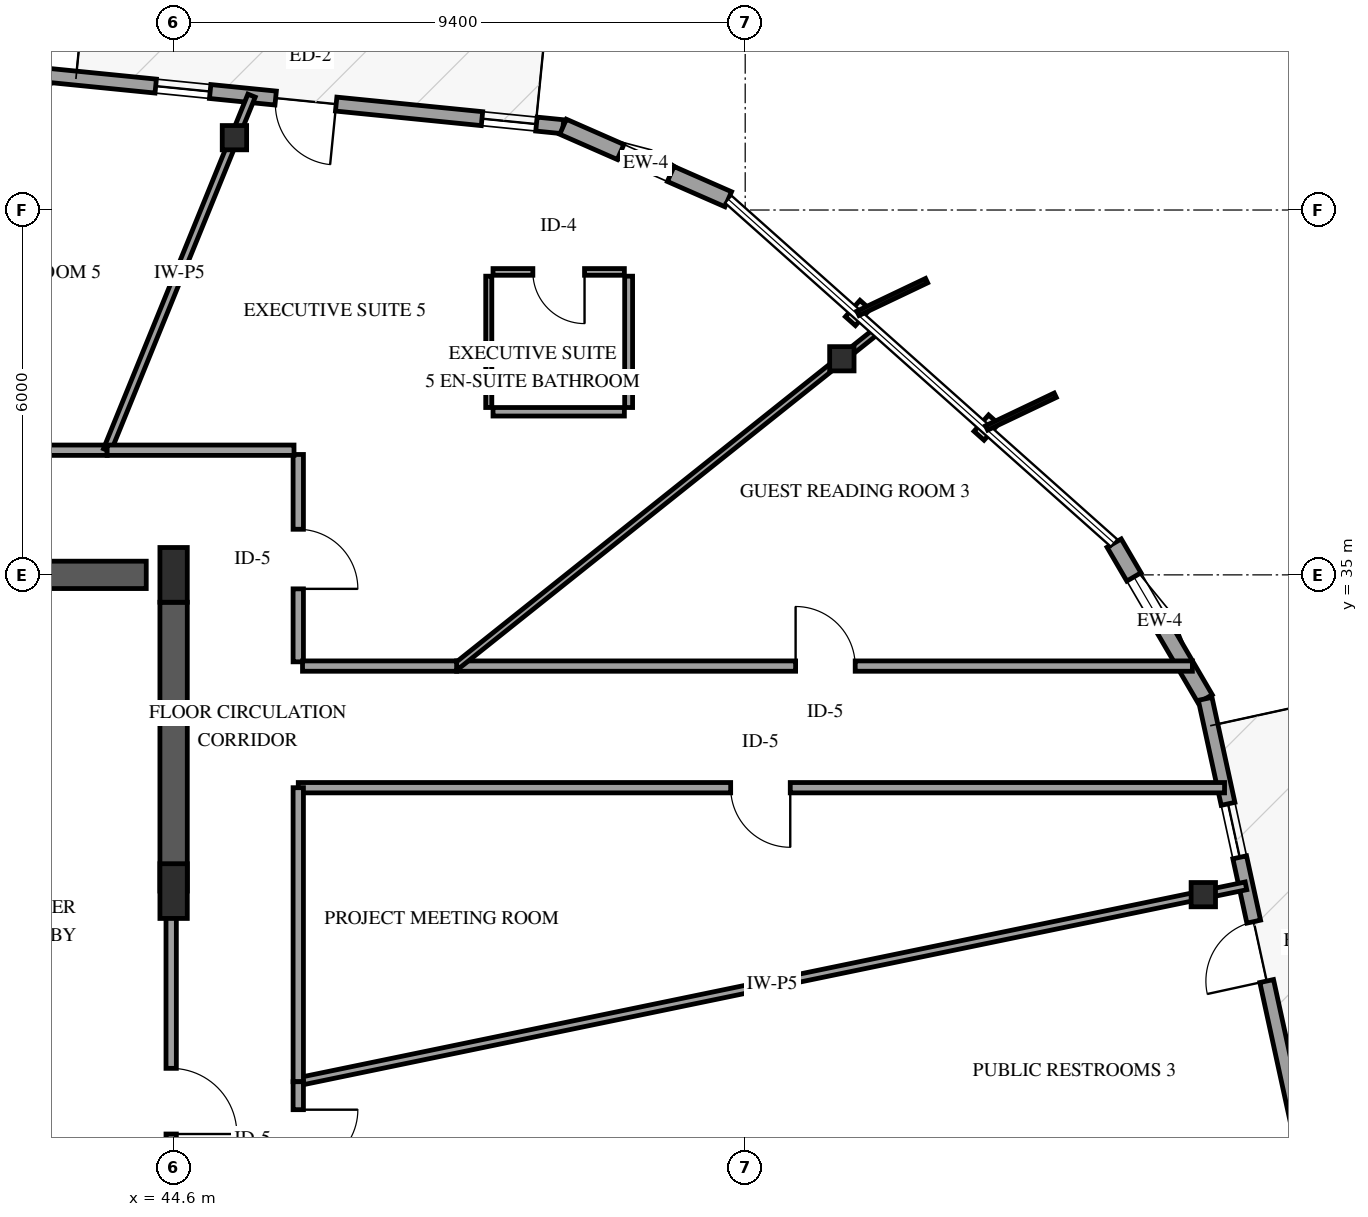
"""IFC4 building model, lengths in metres.
Left out: names, types, materials, properties, quantities, classifications, styles, units other than length and angle.
Written with IfcOpenShell. Run it as: python <this file> out.ifc"""

import sys

from ifc_helpers import new_model, si_unit, direction, frame, frame_2d, origin, origin_2d, place, context, subcontext, project, spatial, rectangle, i_section, extrude, element, fill, save


model = new_model("IFC4")
c1 = context("Model", 3, precision=1e-05, world=origin(), true_north=direction((0.0, 1.0)))
c2 = subcontext(c1, "Body", "Model", "MODEL_VIEW")
j1 = project(units=[si_unit("LENGTHUNIT", "METRE"), si_unit("PLANEANGLEUNIT", "RADIAN")], contexts=[c1])
p1 = place(None, origin())
s1 = spatial("IfcSite", under=j1, at=p1, CompositionType="ELEMENT")
p2 = place(p1, origin())
s2 = spatial("IfcBuilding", under=s1, at=p2, CompositionType="ELEMENT")
p3 = place(p2, frame((0.0, 0.0, 276.25)))
s3 = spatial("IfcBuildingStorey", under=s2, at=p3, CompositionType="ELEMENT", Elevation=276.25)
p4 = place(p3, frame((41.3, 35.0, 0.0), z_axis=(0.0, 0.0, 1.0), x_axis=(1.0, 0.0, 0.0)))
e1 = element("IfcWall", 1, at=p4, inside=s3, PredefinedType="SHEAR", context=c2, shape_type="SweptSolid", body=[
    extrude(rectangle(XDim=2.85, YDim=0.45, at=frame_2d((1.425, 0.0))), origin(), (0.0, 0.0, 1.0), 3.75),
])
p5 = place(p3, frame((44.6, 29.8, 0.0), z_axis=(0.0, 0.0, 1.0), x_axis=(0.0, 1.0, 0.0)))
e2 = element("IfcWall", 2, at=p5, inside=s3, PredefinedType="SHEAR", context=c2, shape_type="SweptSolid", body=[
    extrude(rectangle(XDim=4.75, YDim=0.45, at=frame_2d((2.375, 0.0))), origin(), (0.0, 0.0, 1.0), 3.75),
])
for number, where, z_axis, x_axis in (
    (3, (44.6, 29.8, 0.0), (0.0, 0.0, 1.0), (1.0, 0.0, 0.0)),
    (4, (44.6, 35.0, 0.0), (0.0, 0.0, 1.0), (1.0, 0.0, 0.0)),
):
    element("IfcColumn", number, at=place(p3, frame(where, z_axis=z_axis, x_axis=x_axis)), inside=s3, PredefinedType="PILASTER", context=c2, shape_type="SweptSolid", body=[
        extrude(rectangle(XDim=0.45, YDim=0.9, at=origin_2d()), origin(), (0.0, 0.0, 1.0), 3.75),
    ])
for number, where, z_axis, x_axis in (
    (5, (61.534, 29.741, 0.0), (0.0, 0.0, 1.0), (1.0, 0.0, 0.0)),
    (6, (55.589, 38.554, 0.0), (0.0, 0.0, 1.0), (1.0, 0.0, 0.0)),
    (7, (45.6, 42.189, 0.0), (0.0, 0.0, 1.0), (1.0, 0.0, 0.0)),
):
    element("IfcColumn", number, at=place(p3, frame(where, z_axis=z_axis, x_axis=x_axis)), inside=s3, PredefinedType="COLUMN", context=c2, shape_type="SweptSolid", body=[
        extrude(i_section(OverallWidth=0.401, OverallDepth=0.399, WebThickness=0.025, FlangeThickness=0.04, FilletRadius=0.038, at=origin_2d()), origin(), (0.0, 0.0, 1.0), 3.75),
    ])
p6 = place(p3, frame((51.005, 42.369, 0.0), z_axis=(0.0, 0.0, 1.0), x_axis=(-0.995055090482, 0.099324553384, 0.0)))
e8 = element("IfcWall", 8, at=p6, inside=s3, PredefinedType="SOLIDWALL", context=c2, shape_type="SweptSolid", body=[
    extrude(rectangle(XDim=8.5, YDim=0.23, at=frame_2d((4.25, 0.0))), origin(), (0.0, 0.0, 1.0), 2.829),
])
p7 = place(p6, frame((3.75, 0.0, 0.0)))
e9 = element("IfcOpeningElement", 9, at=p7, cuts=e8, PredefinedType="OPENING", context=c2, shape_type="SweptSolid", body=[
    extrude(rectangle(XDim=1.0, YDim=2.15, at=frame_2d((0.5, 1.075))), frame((0.0, 0.125, 0.0), z_axis=(0.0, -1.0, 0.0), x_axis=(1.0, 0.0, 0.0)), (0.0, 0.0, 1.0), 0.25),
])
p8 = place(p6, frame((0.44, 0.0, 0.72)))
e10 = element("IfcOpeningElement", 10, at=p8, cuts=e8, PredefinedType="OPENING", context=c2, shape_type="SweptSolid", body=[
    extrude(rectangle(XDim=0.9, YDim=1.5, at=frame_2d((0.45, 0.75))), frame((0.0, 0.125, 0.0), z_axis=(0.0, -1.0, 0.0), x_axis=(1.0, 0.0, 0.0)), (0.0, 0.0, 1.0), 0.25),
])
p9 = place(p6, frame((5.833, 0.0, 0.72)))
e11 = element("IfcOpeningElement", 11, at=p9, cuts=e8, PredefinedType="OPENING", context=c2, shape_type="SweptSolid", body=[
    extrude(rectangle(XDim=0.9, YDim=1.5, at=frame_2d((0.45, 0.75))), frame((0.0, 0.125, 0.0), z_axis=(0.0, -1.0, 0.0), x_axis=(1.0, 0.0, 0.0)), (0.0, 0.0, 1.0), 0.25),
])
p10 = place(p3, frame((61.564, 32.961, 0.0), z_axis=(0.0, 0.0, 1.0), x_axis=(-0.504525797249, 0.863396617963, 0.0)))
e12 = element("IfcWall", 12, at=p10, inside=s3, PredefinedType="SOLIDWALL", context=c2, shape_type="SweptSolid", body=[
    extrude(rectangle(XDim=2.967, YDim=0.27, at=frame_2d((1.483, 0.0))), origin(), (0.0, 0.0, 1.0), 2.829),
])
p11 = place(p10, frame((1.422, 0.0, 0.75)))
e13 = element("IfcOpeningElement", 13, at=p11, cuts=e12, PredefinedType="OPENING", context=c2, shape_type="SweptSolid", body=[
    extrude(rectangle(XDim=0.9, YDim=1.5, at=frame_2d((0.45, 0.75))), frame((0.0, 0.145, 0.0), z_axis=(0.0, -1.0, 0.0), x_axis=(1.0, 0.0, 0.0)), (0.0, 0.0, 1.0), 0.29),
])
p12 = place(p3, frame((63.375, 24.656, 0.0), z_axis=(0.0, 0.0, 1.0), x_axis=(-0.213011537402, 0.977049683964, 0.0)))
e14 = element("IfcWall", 14, at=p12, inside=s3, PredefinedType="SOLIDWALL", context=c2, shape_type="SweptSolid", body=[
    extrude(rectangle(XDim=8.5, YDim=0.23, at=frame_2d((4.25, 0.0))), origin(), (0.0, 0.0, 1.0), 2.829),
])
p13 = place(p12, frame((3.75, 0.0, 0.0)))
e15 = element("IfcOpeningElement", 15, at=p13, cuts=e14, PredefinedType="OPENING", context=c2, shape_type="SweptSolid", body=[
    extrude(rectangle(XDim=1.0, YDim=2.15, at=frame_2d((0.5, 1.075))), frame((0.0, 0.125, 0.0), z_axis=(0.0, -1.0, 0.0), x_axis=(1.0, 0.0, 0.0)), (0.0, 0.0, 1.0), 0.25),
])
p14 = place(p12, frame((0.44, 0.0, 0.72)))
e16 = element("IfcOpeningElement", 16, at=p14, cuts=e14, PredefinedType="OPENING", context=c2, shape_type="SweptSolid", body=[
    extrude(rectangle(XDim=0.9, YDim=1.5, at=frame_2d((0.45, 0.75))), frame((0.0, 0.125, 0.0), z_axis=(0.0, -1.0, 0.0), x_axis=(1.0, 0.0, 0.0)), (0.0, 0.0, 1.0), 0.25),
])
p15 = place(p12, frame((5.833, 0.0, 0.72)))
e17 = element("IfcOpeningElement", 17, at=p15, cuts=e14, PredefinedType="OPENING", context=c2, shape_type="SweptSolid", body=[
    extrude(rectangle(XDim=0.9, YDim=1.5, at=frame_2d((0.45, 0.75))), frame((0.0, 0.125, 0.0), z_axis=(0.0, -1.0, 0.0), x_axis=(1.0, 0.0, 0.0)), (0.0, 0.0, 1.0), 0.25),
])
p16 = place(p3, frame((53.721, 41.177, 0.0), z_axis=(0.0, 0.0, 1.0), x_axis=(-0.915675056673, 0.401919383193, 0.0)))
e18 = element("IfcWall", 18, at=p16, inside=s3, PredefinedType="SOLIDWALL", context=c2, shape_type="SweptSolid", body=[
    extrude(rectangle(XDim=2.967, YDim=0.27, at=frame_2d((1.483, 0.0))), origin(), (0.0, 0.0, 1.0), 2.829),
])
p17 = place(p16, frame((1.033, 0.0, 0.75)))
e19 = element("IfcOpeningElement", 19, at=p17, cuts=e18, PredefinedType="OPENING", context=c2, shape_type="SweptSolid", body=[
    extrude(rectangle(XDim=0.9, YDim=1.5, at=frame_2d((0.45, 0.75))), frame((0.0, 0.145, 0.0), z_axis=(0.0, -1.0, 0.0), x_axis=(1.0, 0.0, 0.0)), (0.0, 0.0, 1.0), 0.29),
])
p18 = place(p3, frame((46.65, 26.665, 0.0), z_axis=(0.0, 0.0, 1.0), x_axis=(0.979305001036, 0.202390007028, 0.0)))
e20 = element("IfcWall", 20, at=p18, inside=s3, PredefinedType="PARTITIONING", context=c2, shape_type="SweptSolid", body=[
    extrude(rectangle(XDim=15.915, YDim=0.13, at=frame_2d((7.957, 0.0))), origin(), (0.0, 0.0, 1.0), 2.745),
])
p19 = place(p3, frame((61.883, 31.5, 0.0), z_axis=(0.0, 0.0, 1.0), x_axis=(-1.0, 0.0, 0.0)))
e21 = element("IfcWall", 21, at=p19, inside=s3, PredefinedType="PARTITIONING", context=c2, shape_type="SweptSolid", body=[
    extrude(rectangle(XDim=15.233, YDim=0.17, at=frame_2d((7.617, 0.0))), origin(), (0.0, 0.0, 1.0), 2.824),
])
p20 = place(p19, frame((7.142, 0.0, 0.0)))
e22 = element("IfcOpeningElement", 22, at=p20, cuts=e21, PredefinedType="OPENING", context=c2, shape_type="SweptSolid", body=[
    extrude(rectangle(XDim=0.98, YDim=2.15, at=frame_2d((0.49, 1.075))), frame((0.0, 0.095, 0.0), z_axis=(0.0, -1.0, 0.0), x_axis=(1.0, 0.0, 0.0)), (0.0, 0.0, 1.0), 0.19),
])
p21 = place(p3, frame((30.96, 37.05, 0.0), z_axis=(0.0, 0.0, 1.0), x_axis=(1.0, 0.0, 0.0)))
e23 = element("IfcWall", 23, at=p21, inside=s3, PredefinedType="PARTITIONING", context=c2, shape_type="SweptSolid", body=[
    extrude(rectangle(XDim=12.547, YDim=0.17, at=frame_2d((6.273, 0.0))), origin(), (0.0, 0.0, 1.0), 3.45),
])
p22 = place(p21, frame((5.798, 0.0, 0.0)))
e24 = element("IfcOpeningElement", 24, at=p22, cuts=e23, PredefinedType="OPENING", context=c2, shape_type="SweptSolid", body=[
    extrude(rectangle(XDim=0.98, YDim=2.15, at=frame_2d((0.49, 1.075))), frame((0.0, 0.095, 0.0), z_axis=(0.0, -1.0, 0.0), x_axis=(1.0, 0.0, 0.0)), (0.0, 0.0, 1.0), 0.19),
])
p23 = place(p3, frame((49.254, 33.5, 0.0), z_axis=(0.0, 0.0, 1.0), x_axis=(1.0, 0.0, 0.0)))
e25 = element("IfcWall", 25, at=p23, inside=s3, PredefinedType="PARTITIONING", context=c2, shape_type="SweptSolid", body=[
    extrude(rectangle(XDim=12.1, YDim=0.17, at=frame_2d((6.05, 0.0))), origin(), (0.0, 0.0, 1.0), 3.45),
])
p24 = place(p23, frame((5.575, 0.0, 0.0)))
e26 = element("IfcOpeningElement", 26, at=p24, cuts=e25, PredefinedType="OPENING", context=c2, shape_type="SweptSolid", body=[
    extrude(rectangle(XDim=0.98, YDim=2.15, at=frame_2d((0.49, 1.075))), frame((0.0, 0.095, 0.0), z_axis=(0.0, -1.0, 0.0), x_axis=(1.0, 0.0, 0.0)), (0.0, 0.0, 1.0), 0.19),
])
p25 = place(p3, frame((49.254, 33.5, 0.0), z_axis=(0.0, 0.0, 1.0), x_axis=(0.781717725414, 0.623632422004, 0.0)))
e27 = element("IfcWall", 27, at=p25, inside=s3, PredefinedType="PARTITIONING", context=c2, shape_type="SweptSolid", body=[
    extrude(rectangle(XDim=8.831, YDim=0.11, at=frame_2d((4.415, 0.0))), origin(), (0.0, 0.0, 1.0), 3.45),
])
p26 = place(p3, frame((44.56, 29.8, 0.0), z_axis=(0.0, 0.0, 1.0), x_axis=(0.0, -1.0, 0.0)))
e28 = element("IfcWall", 28, at=p26, inside=s3, PredefinedType="PARTITIONING", context=c2, shape_type="SweptSolid", body=[
    extrude(rectangle(XDim=6.91, YDim=0.17, at=frame_2d((3.455, 0.0))), origin(), (0.0, 0.0, 1.0), 2.49),
])
p27 = place(p26, frame((2.915, 0.0, 0.0)))
e29 = element("IfcOpeningElement", 29, at=p27, cuts=e28, PredefinedType="OPENING", context=c2, shape_type="SweptSolid", body=[
    extrude(rectangle(XDim=1.08, YDim=2.15, at=frame_2d((0.54, 1.075))), frame((0.0, 0.095, 0.0), z_axis=(0.0, -1.0, 0.0), x_axis=(1.0, 0.0, 0.0)), (0.0, 0.0, 1.0), 0.19),
])
p28 = place(p3, frame((43.507, 37.05, 0.0), z_axis=(0.0, 0.0, 1.0), x_axis=(0.377213129566, 0.92612647888, 0.0)))
e30 = element("IfcWall", 30, at=p28, inside=s3, PredefinedType="PARTITIONING", context=c2, shape_type="SweptSolid", body=[
    extrude(rectangle(XDim=6.296, YDim=0.13, at=frame_2d((3.148, 0.0))), origin(), (0.0, 0.0, 1.0), 2.745),
])
p29 = place(p3, frame((46.65, 31.5, 0.0), z_axis=(0.0, 0.0, 1.0), x_axis=(0.0, -1.0, 0.0)))
e31 = element("IfcWall", 31, at=p29, inside=s3, PredefinedType="PARTITIONING", context=c2, shape_type="SweptSolid", body=[
    extrude(rectangle(XDim=4.835, YDim=0.17, at=frame_2d((2.417, 0.0))), origin(), (0.0, 0.0, 1.0), 3.45),
])
p30 = place(p3, frame((46.65, 36.98, 0.0), z_axis=(0.0, 0.0, 1.0), x_axis=(0.0, -1.0, 0.0)))
e32 = element("IfcWall", 32, at=p30, inside=s3, PredefinedType="PARTITIONING", context=c2, shape_type="SweptSolid", body=[
    extrude(rectangle(XDim=3.41, YDim=0.17, at=frame_2d((1.705, 0.0))), origin(), (0.0, 0.0, 1.0), 3.45),
])
p31 = place(p30, frame((1.23, 0.0, 0.0)))
e33 = element("IfcOpeningElement", 33, at=p31, cuts=e32, PredefinedType="OPENING", context=c2, shape_type="SweptSolid", body=[
    extrude(rectangle(XDim=0.98, YDim=2.15, at=frame_2d((0.49, 1.075))), frame((0.0, 0.095, 0.0), z_axis=(0.0, -1.0, 0.0), x_axis=(1.0, 0.0, 0.0)), (0.0, 0.0, 1.0), 0.19),
])
p32 = place(p3, frame((43.507, 37.05, 0.0), z_axis=(0.0, 0.0, 1.0), x_axis=(1.0, 0.0, 0.0)))
e34 = element("IfcWall", 34, at=p32, inside=s3, PredefinedType="PARTITIONING", context=c2, shape_type="SweptSolid", body=[
    extrude(rectangle(XDim=3.073, YDim=0.17, at=frame_2d((1.537, 0.0))), origin(), (0.0, 0.0, 1.0), 3.45),
])
p33 = place(p3, frame((46.72, 33.5, 0.0), z_axis=(0.0, 0.0, 1.0), x_axis=(1.0, 0.0, 0.0)))
e35 = element("IfcWall", 35, at=p33, inside=s3, PredefinedType="PARTITIONING", context=c2, shape_type="SweptSolid", body=[
    extrude(rectangle(XDim=2.534, YDim=0.17, at=frame_2d((1.267, 0.0))), origin(), (0.0, 0.0, 1.0), 2.828),
])
p34 = place(p3, frame((52.013, 39.982, 0.0), z_axis=(0.0, 0.0, 1.0), x_axis=(-1.0, 0.0, 0.0)))
e36 = element("IfcWall", 36, at=p34, inside=s3, PredefinedType="PARTITIONING", context=c2, shape_type="SweptSolid", body=[
    extrude(rectangle(XDim=2.16, YDim=0.11, at=frame_2d((1.08, 0.0))), origin(), (0.0, 0.0, 1.0), 3.45),
])
p35 = place(p34, frame((0.655, 0.0, 0.0)))
e37 = element("IfcOpeningElement", 37, at=p35, cuts=e36, PredefinedType="OPENING", context=c2, shape_type="SweptSolid", body=[
    extrude(rectangle(XDim=0.85, YDim=2.1, at=frame_2d((0.425, 1.05))), frame((0.0, 0.065, 0.0), z_axis=(0.0, -1.0, 0.0), x_axis=(1.0, 0.0, 0.0)), (0.0, 0.0, 1.0), 0.13),
])
p36 = place(p3, frame((49.783, 39.912, 0.0), z_axis=(0.0, 0.0, 1.0), x_axis=(0.0, -1.0, 0.0)))
e38 = element("IfcWall", 38, at=p36, inside=s3, PredefinedType="PARTITIONING", context=c2, shape_type="SweptSolid", body=[
    extrude(rectangle(XDim=2.16, YDim=0.1, at=frame_2d((1.08, 0.0))), origin(), (0.0, 0.0, 1.0), 3.45),
])
p37 = place(p3, frame((49.853, 37.682, 0.0), z_axis=(0.0, 0.0, 1.0), x_axis=(1.0, 0.0, 0.0)))
e39 = element("IfcWall", 39, at=p37, inside=s3, PredefinedType="PARTITIONING", context=c2, shape_type="SweptSolid", body=[
    extrude(rectangle(XDim=2.16, YDim=0.14, at=frame_2d((1.08, 0.0))), origin(), (0.0, 0.0, 1.0), 3.45),
])
p38 = place(p3, frame((52.083, 37.752, 0.0), z_axis=(0.0, 0.0, 1.0), x_axis=(0.0, 1.0, 0.0)))
e40 = element("IfcWall", 40, at=p38, inside=s3, PredefinedType="PARTITIONING", context=c2, shape_type="SweptSolid", body=[
    extrude(rectangle(XDim=2.16, YDim=0.13, at=frame_2d((1.08, 0.0))), origin(), (0.0, 0.0, 1.0), 3.45),
])
p39 = place(p3, frame((46.65, 26.665, 0.0), z_axis=(0.0, 0.0, 1.0), x_axis=(0.0, -1.0, 0.0)))
e41 = element("IfcWall", 41, at=p39, inside=s3, PredefinedType="PARTITIONING", context=c2, shape_type="SweptSolid", body=[
    extrude(rectangle(XDim=1.871, YDim=0.17, at=frame_2d((0.936, 0.0))), origin(), (0.0, 0.0, 1.0), 3.45),
])
p40 = place(p39, frame((0.46, 0.0, 0.0)))
e42 = element("IfcOpeningElement", 42, at=p40, cuts=e41, PredefinedType="OPENING", context=c2, shape_type="SweptSolid", body=[
    extrude(rectangle(XDim=0.98, YDim=2.15, at=frame_2d((0.49, 1.075))), frame((0.0, 0.095, 0.0), z_axis=(0.0, -1.0, 0.0), x_axis=(1.0, 0.0, 0.0)), (0.0, 0.0, 1.0), 0.19),
])
p41 = place(p7, origin())
e43 = element("IfcDoor", 43, at=p41, inside=s3, OperationType="SINGLE_SWING_LEFT", PredefinedType="DOOR", context=c2, shape_type="SweptSolid", body=[
    extrude(rectangle(XDim=1.0, YDim=2.15, at=frame_2d((0.5, 1.075))), frame((0.0, 0.025, 0.0), z_axis=(0.0, -1.0, 0.0), x_axis=(1.0, 0.0, 0.0)), (0.0, 0.0, 1.0), 0.05),
])
fill(e9, e43)
p42 = place(p8, origin())
e44 = element("IfcWindow", 44, at=p42, inside=s3, PartitioningType="SINGLE_PANEL", PredefinedType="WINDOW", context=c2, shape_type="SweptSolid", body=[
    extrude(rectangle(XDim=0.9, YDim=1.5, at=frame_2d((0.45, 0.75))), frame((0.0, 0.03, 0.0), z_axis=(0.0, -1.0, 0.0), x_axis=(1.0, 0.0, 0.0)), (0.0, 0.0, 1.0), 0.06),
])
fill(e10, e44)
p43 = place(p9, origin())
e45 = element("IfcWindow", 45, at=p43, inside=s3, PartitioningType="SINGLE_PANEL", PredefinedType="WINDOW", context=c2, shape_type="SweptSolid", body=[
    extrude(rectangle(XDim=0.9, YDim=1.5, at=frame_2d((0.45, 0.75))), frame((0.0, 0.03, 0.0), z_axis=(0.0, -1.0, 0.0), x_axis=(1.0, 0.0, 0.0)), (0.0, 0.0, 1.0), 0.06),
])
fill(e11, e45)
p44 = place(p11, origin())
e46 = element("IfcWindow", 46, at=p44, inside=s3, PartitioningType="SINGLE_PANEL", PredefinedType="WINDOW", context=c2, shape_type="SweptSolid", body=[
    extrude(rectangle(XDim=0.9, YDim=1.5, at=frame_2d((0.45, 0.75))), frame((0.0, 0.03, 0.0), z_axis=(0.0, -1.0, 0.0), x_axis=(1.0, 0.0, 0.0)), (0.0, 0.0, 1.0), 0.06),
])
fill(e13, e46)
p45 = place(p13, origin())
e47 = element("IfcDoor", 47, at=p45, inside=s3, OperationType="SINGLE_SWING_LEFT", PredefinedType="DOOR", context=c2, shape_type="SweptSolid", body=[
    extrude(rectangle(XDim=1.0, YDim=2.15, at=frame_2d((0.5, 1.075))), frame((0.0, 0.025, 0.0), z_axis=(0.0, -1.0, 0.0), x_axis=(1.0, 0.0, 0.0)), (0.0, 0.0, 1.0), 0.05),
])
fill(e15, e47)
p46 = place(p15, origin())
e48 = element("IfcWindow", 48, at=p46, inside=s3, PartitioningType="SINGLE_PANEL", PredefinedType="WINDOW", context=c2, shape_type="SweptSolid", body=[
    extrude(rectangle(XDim=0.9, YDim=1.5, at=frame_2d((0.45, 0.75))), frame((0.0, 0.03, 0.0), z_axis=(0.0, -1.0, 0.0), x_axis=(1.0, 0.0, 0.0)), (0.0, 0.0, 1.0), 0.06),
])
fill(e17, e48)
p47 = place(p17, origin())
e49 = element("IfcWindow", 49, at=p47, inside=s3, PartitioningType="SINGLE_PANEL", PredefinedType="WINDOW", context=c2, shape_type="SweptSolid", body=[
    extrude(rectangle(XDim=0.9, YDim=1.5, at=frame_2d((0.45, 0.75))), frame((0.0, 0.03, 0.0), z_axis=(0.0, -1.0, 0.0), x_axis=(1.0, 0.0, 0.0)), (0.0, 0.0, 1.0), 0.06),
])
fill(e19, e49)
p48 = place(p20, origin())
e50 = element("IfcDoor", 50, at=p48, inside=s3, OperationType="SINGLE_SWING_LEFT", PredefinedType="DOOR", context=c2, shape_type="SweptSolid", body=[
    extrude(rectangle(XDim=0.98, YDim=2.15, at=frame_2d((0.49, 1.075))), frame((0.0, 0.025, 0.0), z_axis=(0.0, -1.0, 0.0), x_axis=(1.0, 0.0, 0.0)), (0.0, 0.0, 1.0), 0.05),
])
fill(e22, e50)
p49 = place(p24, origin())
e51 = element("IfcDoor", 51, at=p49, inside=s3, OperationType="SINGLE_SWING_LEFT", PredefinedType="DOOR", context=c2, shape_type="SweptSolid", body=[
    extrude(rectangle(XDim=0.98, YDim=2.15, at=frame_2d((0.49, 1.075))), frame((0.0, 0.025, 0.0), z_axis=(0.0, -1.0, 0.0), x_axis=(1.0, 0.0, 0.0)), (0.0, 0.0, 1.0), 0.05),
])
fill(e26, e51)
p50 = place(p27, origin())
e52 = element("IfcDoor", 52, at=p50, inside=s3, OperationType="SINGLE_SWING_RIGHT", PredefinedType="DOOR", context=c2, shape_type="SweptSolid", body=[
    extrude(rectangle(XDim=1.08, YDim=2.15, at=frame_2d((0.54, 1.075))), frame((0.0, 0.025, 0.0), z_axis=(0.0, -1.0, 0.0), x_axis=(1.0, 0.0, 0.0)), (0.0, 0.0, 1.0), 0.05),
])
fill(e29, e52)
p51 = place(p31, origin())
e53 = element("IfcDoor", 53, at=p51, inside=s3, OperationType="SINGLE_SWING_RIGHT", PredefinedType="DOOR", context=c2, shape_type="SweptSolid", body=[
    extrude(rectangle(XDim=0.98, YDim=2.15, at=frame_2d((0.49, 1.075))), frame((0.0, 0.025, 0.0), z_axis=(0.0, -1.0, 0.0), x_axis=(1.0, 0.0, 0.0)), (0.0, 0.0, 1.0), 0.05),
])
fill(e33, e53)
p52 = place(p35, origin())
e54 = element("IfcDoor", 54, at=p52, inside=s3, OperationType="SINGLE_SWING_LEFT", PredefinedType="DOOR", context=c2, shape_type="SweptSolid", body=[
    extrude(rectangle(XDim=0.85, YDim=2.1, at=frame_2d((0.425, 1.05))), frame((0.0, 0.025, 0.0), z_axis=(0.0, -1.0, 0.0), x_axis=(1.0, 0.0, 0.0)), (0.0, 0.0, 1.0), 0.05),
])
fill(e37, e54)
p53 = place(p40, origin())
e55 = element("IfcDoor", 55, at=p53, inside=s3, OperationType="SINGLE_SWING_LEFT", PredefinedType="DOOR", context=c2, shape_type="SweptSolid", body=[
    extrude(rectangle(XDim=0.98, YDim=2.15, at=frame_2d((0.49, 1.075))), frame((0.0, 0.025, 0.0), z_axis=(0.0, -1.0, 0.0), x_axis=(1.0, 0.0, 0.0)), (0.0, 0.0, 1.0), 0.05),
])
fill(e42, e55)
save(model, sys.argv[1])
